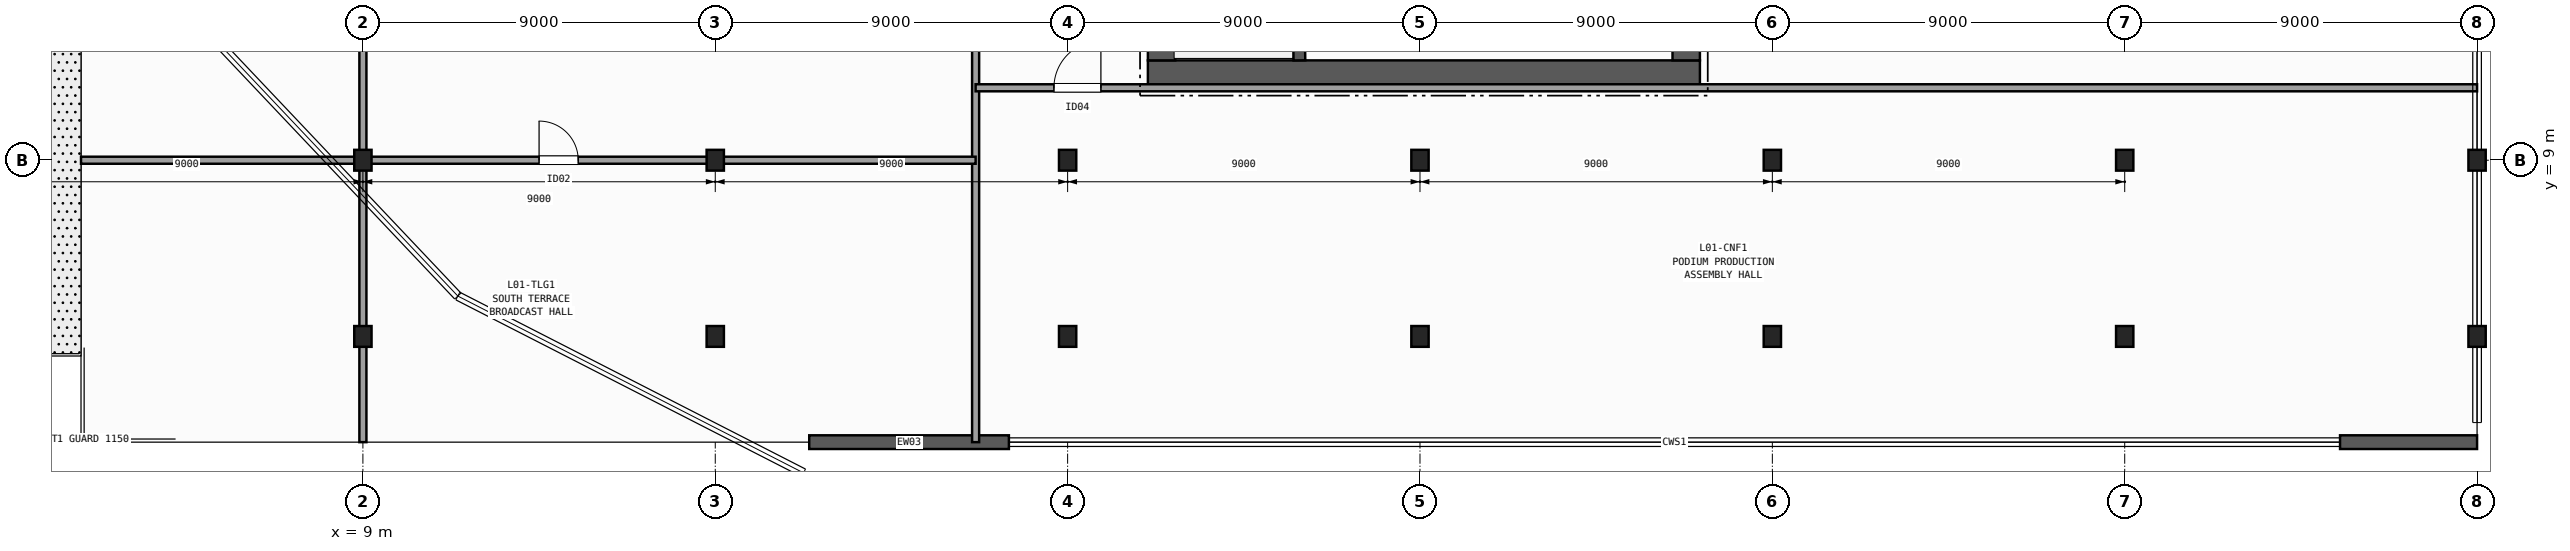
"""IFC4 building model, lengths in metres.
Left out: names, types, materials, properties, quantities, classifications, styles, units other than length and angle.
Written with IfcOpenShell. Run it as: python <this file> out.ifc"""

import sys

from ifc_helpers import new_model, si_unit, direction, frame, frame_2d, origin, origin_2d, place, context, subcontext, project, spatial, rectangle, i_section, extrude, element, fill, save


model = new_model("IFC4")
c1 = context("Model", 3, precision=1e-05, world=origin(), true_north=direction((0.0, 1.0)))
c2 = subcontext(c1, "Body", "Model", "MODEL_VIEW")
j1 = project(units=[si_unit("LENGTHUNIT", "METRE"), si_unit("PLANEANGLEUNIT", "RADIAN")], contexts=[c1])
p1 = place(None, origin())
s1 = spatial("IfcSite", under=j1, at=p1, CompositionType="ELEMENT")
p2 = place(p1, origin())
s2 = spatial("IfcBuilding", under=s1, at=p2, CompositionType="ELEMENT")
p3 = place(p2, frame((0.0, 0.0, 5.8)))
s3 = spatial("IfcBuildingStorey", under=s2, at=p3, CompositionType="ELEMENT", Elevation=5.8)
for number, where, z_axis, x_axis in (
    (1, (9.0, 9.0, 0.0), (0.0, 0.0, 1.0), (1.0, 0.0, 0.0)),
    (2, (18.0, 9.0, 0.0), (0.0, 0.0, 1.0), (1.0, 0.0, 0.0)),
    (3, (27.0, 9.0, 0.0), (0.0, 0.0, 1.0), (1.0, 0.0, 0.0)),
    (4, (36.0, 9.0, 0.0), (0.0, 0.0, 1.0), (1.0, 0.0, 0.0)),
    (5, (45.0, 9.0, 0.0), (0.0, 0.0, 1.0), (1.0, 0.0, 0.0)),
    (6, (54.0, 9.0, 0.0), (0.0, 0.0, 1.0), (1.0, 0.0, 0.0)),
    (7, (63.0, 9.0, 0.0), (0.0, 0.0, 1.0), (1.0, 0.0, 0.0)),
    (8, (9.0, 4.5, 0.0), (0.0, 0.0, 1.0), (1.0, 0.0, 0.0)),
    (9, (18.0, 4.5, 0.0), (0.0, 0.0, 1.0), (1.0, 0.0, 0.0)),
    (10, (27.0, 4.5, 0.0), (0.0, 0.0, 1.0), (1.0, 0.0, 0.0)),
    (11, (36.0, 4.5, 0.0), (0.0, 0.0, 1.0), (1.0, 0.0, 0.0)),
    (12, (45.0, 4.5, 0.0), (0.0, 0.0, 1.0), (1.0, 0.0, 0.0)),
    (13, (54.0, 4.5, 0.0), (0.0, 0.0, 1.0), (1.0, 0.0, 0.0)),
    (14, (63.0, 4.5, 0.0), (0.0, 0.0, 1.0), (1.0, 0.0, 0.0)),
):
    element("IfcColumn", number, at=place(p3, frame(where, z_axis=z_axis, x_axis=x_axis)), inside=s3, PredefinedType="COLUMN", context=c2, shape_type="SweptSolid", body=[
        extrude(i_section(OverallWidth=0.442, OverallDepth=0.531, WebThickness=0.066, FlangeThickness=0.106, FilletRadius=0.015, at=origin_2d()), origin(), (0.0, 0.0, 1.0), 5.2),
    ])
p4 = place(p3, frame((25.5, 1.8, 0.0), z_axis=(0.0, 0.0, 1.0), x_axis=(-1.0, 0.0, 0.0)))
e15 = element("IfcWall", 15, at=p4, inside=s3, PredefinedType="SOLIDWALL", context=c2, shape_type="SweptSolid", body=[
    extrude(rectangle(XDim=5.1, YDim=0.35, at=frame_2d((2.55, 0.0))), origin(), (0.0, 0.0, 1.0), 4.88),
])
p5 = place(p3, frame((63.0, 1.8, 0.0), z_axis=(0.0, 0.0, 1.0), x_axis=(-1.0, 0.0, 0.0)))
e16 = element("IfcWall", 16, at=p5, inside=s3, PredefinedType="SOLIDWALL", context=c2, shape_type="SweptSolid", body=[
    extrude(rectangle(XDim=3.5, YDim=0.35, at=frame_2d((1.75, 0.0))), origin(), (0.0, 0.0, 1.0), 4.88),
])
p6 = place(p3, frame((29.05, 11.2, 0.0), z_axis=(0.0, 0.0, 1.0), x_axis=(1.0, 0.0, 0.0)))
e17 = element("IfcWall", 17, at=p6, inside=s3, PredefinedType="SHEAR", context=c2, shape_type="SweptSolid", body=[
    extrude(rectangle(XDim=14.1, YDim=0.7, at=frame_2d((7.05, 0.0))), origin(), (0.0, 0.0, 1.0), 4.88),
])
p7 = place(p3, frame((29.4, 24.25, 0.0), z_axis=(0.0, 0.0, 1.0), x_axis=(0.0, -1.0, 0.0)))
e18 = element("IfcWall", 18, at=p7, inside=s3, PredefinedType="SHEAR", context=c2, shape_type="SweptSolid", body=[
    extrude(rectangle(XDim=12.7, YDim=0.7, at=frame_2d((6.35, 0.0))), origin(), (0.0, 0.0, 1.0), 4.88),
])
p8 = place(p7, frame((1.35, 0.0, 0.0)))
e19 = element("IfcOpeningElement", 19, at=p8, cuts=e18, PredefinedType="OPENING", context=c2, shape_type="SweptSolid", body=[
    extrude(rectangle(XDim=1.35, YDim=2.15, at=frame_2d((0.675, 1.075))), frame((0.0, 0.36, 0.0), z_axis=(0.0, -1.0, 0.0), x_axis=(1.0, 0.0, 0.0)), (0.0, 0.0, 1.0), 0.72),
])
p9 = place(p3, frame((42.8, 11.55, 0.0), z_axis=(0.0, 0.0, 1.0), x_axis=(0.0, 1.0, 0.0)))
e20 = element("IfcWall", 20, at=p9, inside=s3, PredefinedType="SHEAR", context=c2, shape_type="SweptSolid", body=[
    extrude(rectangle(XDim=12.7, YDim=0.7, at=frame_2d((6.35, 0.0))), origin(), (0.0, 0.0, 1.0), 4.88),
])
p10 = place(p3, frame((32.92, 11.55, 0.0), z_axis=(0.0, 0.0, 1.0), x_axis=(-0.01331804616, 0.99991131089, 0.0)))
e21 = element("IfcWall", 21, at=p10, inside=s3, PredefinedType="SHEAR", context=c2, shape_type="SweptSolid", body=[
    extrude(rectangle(XDim=9.001, YDim=0.3, at=frame_2d((4.5, 0.0))), origin(), (0.0, 0.0, 1.0), 4.88),
])
p11 = place(p3, frame((24.65, 1.8, 0.0), z_axis=(0.0, 0.0, 1.0), x_axis=(0.0, 1.0, 0.0)))
e22 = element("IfcWall", 22, at=p11, inside=s3, PredefinedType="PARTITIONING", context=c2, shape_type="SweptSolid", body=[
    extrude(rectangle(XDim=26.4, YDim=0.18, at=frame_2d((13.2, 0.0))), origin(), (0.0, 0.0, 1.0), 3.912),
])
p12 = place(p11, frame((12.2, 0.0, 0.0)))
e23 = element("IfcOpeningElement", 23, at=p12, cuts=e22, PredefinedType="OPENING", context=c2, shape_type="SweptSolid", body=[
    extrude(rectangle(XDim=1.4, YDim=2.15, at=frame_2d((0.7, 1.075))), frame((0.0, 0.1, 0.0), z_axis=(0.0, -1.0, 0.0), x_axis=(1.0, 0.0, 0.0)), (0.0, 0.0, 1.0), 0.2),
])
p13 = place(p3, frame((24.65, 10.85, 0.0), z_axis=(0.0, 0.0, 1.0), x_axis=(1.0, 0.0, 0.0)))
e24 = element("IfcWall", 24, at=p13, inside=s3, PredefinedType="PARTITIONING", context=c2, shape_type="SweptSolid", body=[
    extrude(rectangle(XDim=38.35, YDim=0.18, at=frame_2d((19.175, 0.0))), origin(), (0.0, 0.0, 1.0), 4.005),
])
p14 = place(p13, frame((2.0, 0.0, 0.0)))
e25 = element("IfcOpeningElement", 25, at=p14, cuts=e24, PredefinedType="OPENING", context=c2, shape_type="SweptSolid", body=[
    extrude(rectangle(XDim=1.2, YDim=2.15, at=frame_2d((0.6, 1.075))), frame((0.0, 0.1, 0.0), z_axis=(0.0, -1.0, 0.0), x_axis=(1.0, 0.0, 0.0)), (0.0, 0.0, 1.0), 0.2),
])
p15 = place(p3, frame((9.0, 1.8, 0.0), z_axis=(0.0, 0.0, 1.0), x_axis=(0.0, 1.0, 0.0)))
e26 = element("IfcWall", 26, at=p15, inside=s3, PredefinedType="PARTITIONING", context=c2, shape_type="SweptSolid", body=[
    extrude(rectangle(XDim=52.2, YDim=0.18, at=frame_2d((26.1, 0.0))), origin(), (0.0, 0.0, 1.0), 3.912),
])
p16 = place(p15, frame((12.2, 0.0, 0.0)))
e27 = element("IfcOpeningElement", 27, at=p16, cuts=e26, PredefinedType="OPENING", context=c2, shape_type="SweptSolid", body=[
    extrude(rectangle(XDim=1.2, YDim=2.15, at=frame_2d((0.6, 1.075))), frame((0.0, 0.1, 0.0), z_axis=(0.0, -1.0, 0.0), x_axis=(1.0, 0.0, 0.0)), (0.0, 0.0, 1.0), 0.2),
])
p17 = place(p3, frame((1.8, 9.0, 0.0), z_axis=(0.0, 0.0, 1.0), x_axis=(1.0, 0.0, 0.0)))
e28 = element("IfcWall", 28, at=p17, inside=s3, PredefinedType="PARTITIONING", context=c2, shape_type="SweptSolid", body=[
    extrude(rectangle(XDim=22.85, YDim=0.18, at=frame_2d((11.425, 0.0))), origin(), (0.0, 0.0, 1.0), 3.933),
])
p18 = place(p17, frame((11.7, 0.0, 0.0)))
e29 = element("IfcOpeningElement", 29, at=p18, cuts=e28, PredefinedType="OPENING", context=c2, shape_type="SweptSolid", body=[
    extrude(rectangle(XDim=1.0, YDim=2.1, at=frame_2d((0.5, 1.05))), frame((0.0, 0.1, 0.0), z_axis=(0.0, -1.0, 0.0), x_axis=(1.0, 0.0, 0.0)), (0.0, 0.0, 1.0), 0.2),
])
p19 = place(p14, origin())
e30 = element("IfcDoor", 30, at=p19, inside=s3, OperationType="SINGLE_SWING_RIGHT", PredefinedType="DOOR", context=c2, shape_type="SweptSolid", body=[
    extrude(rectangle(XDim=1.2, YDim=2.15, at=frame_2d((0.6, 1.075))), frame((0.0, 0.025, 0.0), z_axis=(0.0, -1.0, 0.0), x_axis=(1.0, 0.0, 0.0)), (0.0, 0.0, 1.0), 0.05),
])
fill(e25, e30)
p20 = place(p18, origin())
e31 = element("IfcDoor", 31, at=p20, inside=s3, OperationType="SINGLE_SWING_LEFT", PredefinedType="DOOR", context=c2, shape_type="SweptSolid", body=[
    extrude(rectangle(XDim=1.0, YDim=2.1, at=frame_2d((0.5, 1.05))), frame((0.0, 0.025, 0.0), z_axis=(0.0, -1.0, 0.0), x_axis=(1.0, 0.0, 0.0)), (0.0, 0.0, 1.0), 0.05),
])
fill(e29, e31)
save(model, sys.argv[1])
